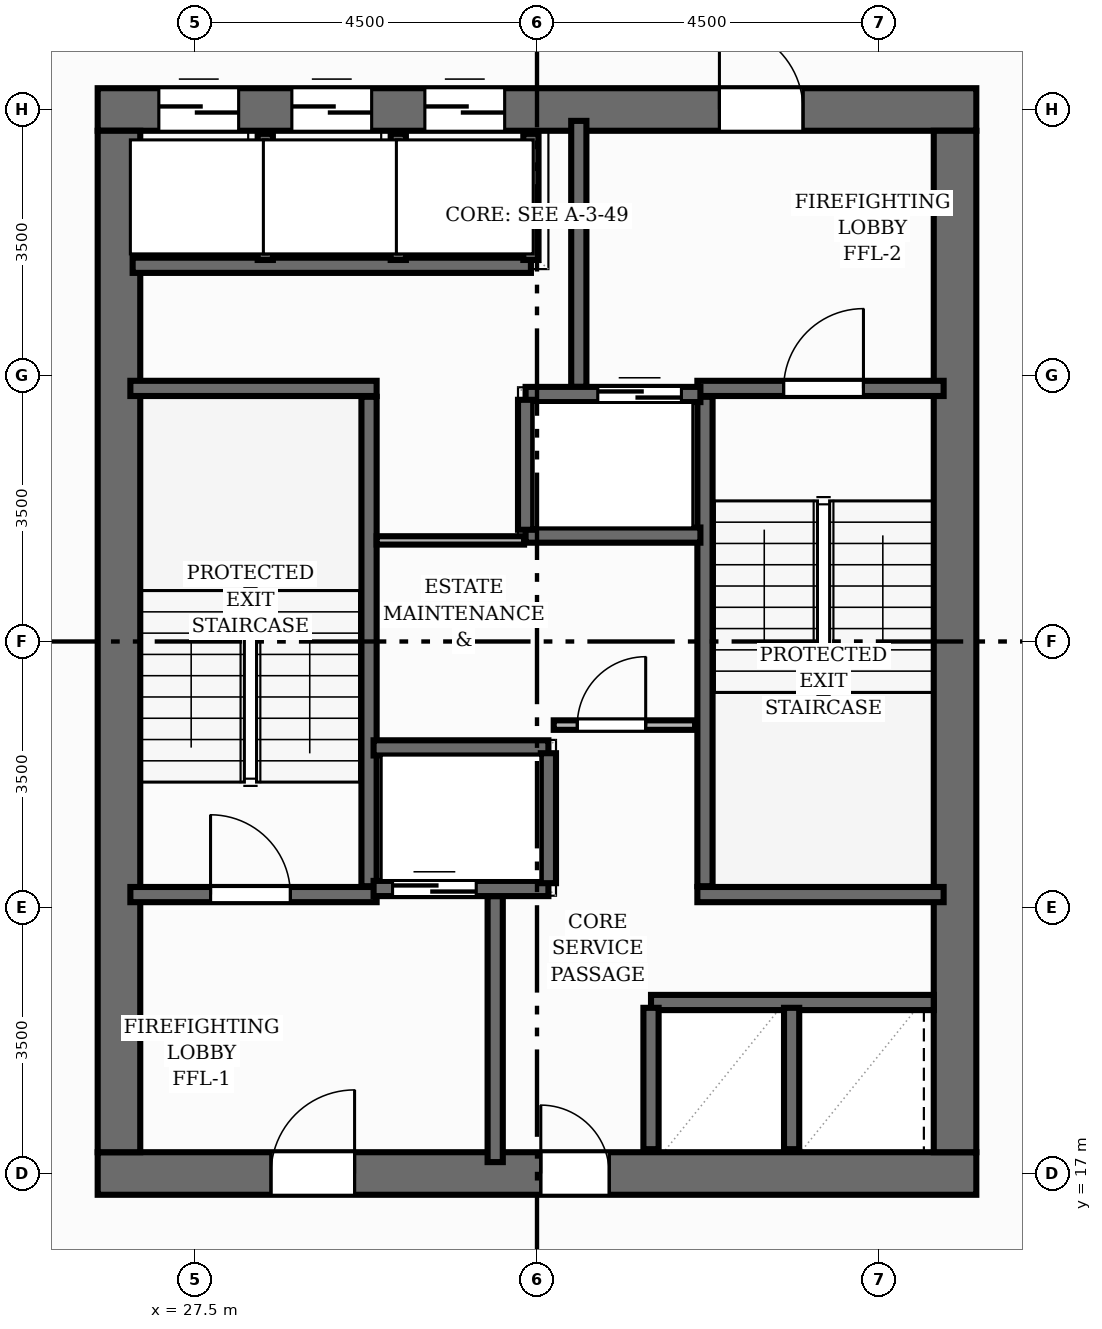
"""IFC4 building model, lengths in metres.
Left out: names, types, materials, properties, quantities, classifications, styles, units other than length and angle.
Written with IfcOpenShell. Run it as: python <this file> out.ifc"""

import sys

from ifc_helpers import new_model, si_unit, direction, frame, frame_2d, origin, place, context, subcontext, project, spatial, rectangle, extrude, element, fill, save


model = new_model("IFC4")
c1 = context("Model", 3, precision=1e-05, world=origin(), true_north=direction((0.0, 1.0)))
c2 = subcontext(c1, "Body", "Model", "MODEL_VIEW")
j1 = project(units=[si_unit("LENGTHUNIT", "METRE"), si_unit("PLANEANGLEUNIT", "RADIAN")], contexts=[c1])
p1 = place(None, origin())
s1 = spatial("IfcSite", under=j1, at=p1, CompositionType="ELEMENT")
p2 = place(p1, origin())
s2 = spatial("IfcBuilding", under=s1, at=p2, CompositionType="ELEMENT")
p3 = place(p2, frame((0.0, 0.0, 204.64)))
s3 = spatial("IfcBuildingStorey", under=s2, at=p3, CompositionType="ELEMENT", Elevation=204.64)
p4 = place(p3, frame((26.22, 17.0, 0.0), z_axis=(0.0, 0.0, 1.0), x_axis=(1.0, 0.0, 0.0)))
e1 = element("IfcWall", 1, at=p4, inside=s3, PredefinedType="SHEAR", context=c2, shape_type="SweptSolid", body=[
    extrude(rectangle(XDim=11.56, YDim=0.56, at=frame_2d((5.78, 0.0))), origin(), (0.0, 0.0, 1.0), 3.2),
])
p5 = place(p4, frame((2.28, 0.0, 0.0)))
e2 = element("IfcOpeningElement", 2, at=p5, cuts=e1, PredefinedType="OPENING", context=c2, shape_type="SweptSolid", body=[
    extrude(rectangle(XDim=1.1, YDim=2.15, at=frame_2d((0.55, 1.075))), frame((0.0, 0.29, 0.0), z_axis=(0.0, -1.0, 0.0), x_axis=(1.0, 0.0, 0.0)), (0.0, 0.0, 1.0), 0.58),
])
p6 = place(p4, frame((5.83, 0.0, 0.0)))
e3 = element("IfcOpeningElement", 3, at=p6, cuts=e1, PredefinedType="OPENING", context=c2, shape_type="SweptSolid", body=[
    extrude(rectangle(XDim=0.9, YDim=2.1, at=frame_2d((0.45, 1.05))), frame((0.0, 0.29, 0.0), z_axis=(0.0, -1.0, 0.0), x_axis=(1.0, 0.0, 0.0)), (0.0, 0.0, 1.0), 0.58),
])
p7 = place(p3, frame((26.22, 31.0, 0.0), z_axis=(0.0, 0.0, 1.0), x_axis=(1.0, 0.0, 0.0)))
e4 = element("IfcWall", 4, at=p7, inside=s3, PredefinedType="SHEAR", context=c2, shape_type="SweptSolid", body=[
    extrude(rectangle(XDim=11.56, YDim=0.56, at=frame_2d((5.78, 0.0))), origin(), (0.0, 0.0, 1.0), 3.2),
])
p8 = place(p7, frame((8.18, 0.0, 0.0)))
e5 = element("IfcOpeningElement", 5, at=p8, cuts=e4, PredefinedType="OPENING", context=c2, shape_type="SweptSolid", body=[
    extrude(rectangle(XDim=1.1, YDim=2.15, at=frame_2d((0.55, 1.075))), frame((0.0, 0.29, 0.0), z_axis=(0.0, -1.0, 0.0), x_axis=(1.0, 0.0, 0.0)), (0.0, 0.0, 1.0), 0.58),
])
p9 = place(p7, frame((0.805, 0.0, 0.0)))
e6 = element("IfcOpeningElement", 6, at=p9, cuts=e4, PredefinedType="OPENING", context=c2, shape_type="SweptSolid", body=[
    extrude(rectangle(XDim=1.05, YDim=2.15, at=frame_2d((0.525, 1.075))), frame((0.0, 0.29, 0.0), z_axis=(0.0, -1.0, 0.0), x_axis=(1.0, 0.0, 0.0)), (0.0, 0.0, 1.0), 0.58),
])
p10 = place(p7, frame((2.555, 0.0, 0.0)))
e7 = element("IfcOpeningElement", 7, at=p10, cuts=e4, PredefinedType="OPENING", context=c2, shape_type="SweptSolid", body=[
    extrude(rectangle(XDim=1.05, YDim=2.15, at=frame_2d((0.525, 1.075))), frame((0.0, 0.29, 0.0), z_axis=(0.0, -1.0, 0.0), x_axis=(1.0, 0.0, 0.0)), (0.0, 0.0, 1.0), 0.58),
])
p11 = place(p7, frame((4.305, 0.0, 0.0)))
e8 = element("IfcOpeningElement", 8, at=p11, cuts=e4, PredefinedType="OPENING", context=c2, shape_type="SweptSolid", body=[
    extrude(rectangle(XDim=1.05, YDim=2.15, at=frame_2d((0.525, 1.075))), frame((0.0, 0.29, 0.0), z_axis=(0.0, -1.0, 0.0), x_axis=(1.0, 0.0, 0.0)), (0.0, 0.0, 1.0), 0.58),
])
for number, where, z_axis, x_axis in (
    (9, (26.5, 17.28, 0.0), (0.0, 0.0, 1.0), (0.0, 1.0, 0.0)),
    (10, (37.5, 17.28, 0.0), (0.0, 0.0, 1.0), (0.0, 1.0, 0.0)),
):
    element("IfcWall", number, at=place(p3, frame(where, z_axis=z_axis, x_axis=x_axis)), inside=s3, PredefinedType="SHEAR", context=c2, shape_type="SweptSolid", body=[
        extrude(rectangle(XDim=13.44, YDim=0.56, at=frame_2d((6.72, 0.0))), origin(), (0.0, 0.0, 1.0), 3.2),
    ])
p12 = place(p3, frame((29.79, 20.78, 0.0), z_axis=(0.0, 0.0, 1.0), x_axis=(0.0, 1.0, 0.0)))
e11 = element("IfcWall", 11, at=p12, inside=s3, PredefinedType="SHEAR", context=c2, shape_type="SweptSolid", body=[
    extrude(rectangle(XDim=6.44, YDim=0.2, at=frame_2d((3.22, 0.0))), origin(), (0.0, 0.0, 1.0), 3.2),
])
p13 = place(p3, frame((26.65, 27.33, 0.0), z_axis=(0.0, 0.0, 1.0), x_axis=(1.0, 0.0, 0.0)))
e12 = element("IfcWall", 12, at=p13, inside=s3, PredefinedType="SHEAR", context=c2, shape_type="SweptSolid", body=[
    extrude(rectangle(XDim=3.24, YDim=0.2, at=frame_2d((1.62, 0.0))), origin(), (0.0, 0.0, 1.0), 3.2),
])
p14 = place(p3, frame((26.65, 20.67, 0.0), z_axis=(0.0, 0.0, 1.0), x_axis=(1.0, 0.0, 0.0)))
e13 = element("IfcWall", 13, at=p14, inside=s3, PredefinedType="SHEAR", context=c2, shape_type="SweptSolid", body=[
    extrude(rectangle(XDim=3.24, YDim=0.2, at=frame_2d((1.62, 0.0))), origin(), (0.0, 0.0, 1.0), 3.2),
])
p15 = place(p14, frame((1.055, 0.0, 0.0)))
e14 = element("IfcOpeningElement", 14, at=p15, cuts=e13, PredefinedType="OPENING", context=c2, shape_type="SweptSolid", body=[
    extrude(rectangle(XDim=1.05, YDim=2.15, at=frame_2d((0.525, 1.075))), frame((0.0, 0.11, 0.0), z_axis=(0.0, -1.0, 0.0), x_axis=(1.0, 0.0, 0.0)), (0.0, 0.0, 1.0), 0.22),
])
p16 = place(p3, frame((34.21, 20.78, 0.0), z_axis=(0.0, 0.0, 1.0), x_axis=(0.0, 1.0, 0.0)))
e15 = element("IfcWall", 15, at=p16, inside=s3, PredefinedType="SHEAR", context=c2, shape_type="SweptSolid", body=[
    extrude(rectangle(XDim=6.44, YDim=0.2, at=frame_2d((3.22, 0.0))), origin(), (0.0, 0.0, 1.0), 3.2),
])
p17 = place(p3, frame((34.11, 20.67, 0.0), z_axis=(0.0, 0.0, 1.0), x_axis=(1.0, 0.0, 0.0)))
e16 = element("IfcWall", 16, at=p17, inside=s3, PredefinedType="SHEAR", context=c2, shape_type="SweptSolid", body=[
    extrude(rectangle(XDim=3.24, YDim=0.2, at=frame_2d((1.62, 0.0))), origin(), (0.0, 0.0, 1.0), 3.2),
])
p18 = place(p3, frame((34.11, 27.33, 0.0), z_axis=(0.0, 0.0, 1.0), x_axis=(1.0, 0.0, 0.0)))
e17 = element("IfcWall", 17, at=p18, inside=s3, PredefinedType="SHEAR", context=c2, shape_type="SweptSolid", body=[
    extrude(rectangle(XDim=3.24, YDim=0.2, at=frame_2d((1.62, 0.0))), origin(), (0.0, 0.0, 1.0), 3.2),
])
p19 = place(p18, frame((1.135, 0.0, 0.0)))
e18 = element("IfcOpeningElement", 18, at=p19, cuts=e17, PredefinedType="OPENING", context=c2, shape_type="SweptSolid", body=[
    extrude(rectangle(XDim=1.05, YDim=2.15, at=frame_2d((0.525, 1.075))), frame((0.0, 0.11, 0.0), z_axis=(0.0, -1.0, 0.0), x_axis=(1.0, 0.0, 0.0)), (0.0, 0.0, 1.0), 0.22),
])
for number, where, z_axis, x_axis in (
    (19, (31.45, 17.15, 0.0), (0.0, 0.0, 1.0), (0.0, 1.0, 0.0)),
    (20, (32.55, 27.35, 0.0), (0.0, 0.0, 1.0), (0.0, 1.0, 0.0)),
):
    element("IfcWall", number, at=place(p3, frame(where, z_axis=z_axis, x_axis=x_axis)), inside=s3, PredefinedType="SHEAR", context=c2, shape_type="SweptSolid", body=[
        extrude(rectangle(XDim=3.5, YDim=0.2, at=frame_2d((1.75, 0.0))), origin(), (0.0, 0.0, 1.0), 3.2),
    ])
p20 = place(p3, frame((29.85, 20.75, 0.0), z_axis=(0.0, 0.0, 1.0), x_axis=(1.0, 0.0, 0.0)))
e21 = element("IfcWall", 21, at=p20, inside=s3, PredefinedType="SHEAR", context=c2, shape_type="SweptSolid", body=[
    extrude(rectangle(XDim=2.3, YDim=0.2, at=frame_2d((1.15, 0.0))), origin(), (0.0, 0.0, 1.0), 3.2),
])
p21 = place(p20, frame((0.25, 0.0, 0.0)))
e22 = element("IfcOpeningElement", 22, at=p21, cuts=e21, PredefinedType="OPENING", context=c2, shape_type="SweptSolid", body=[
    extrude(rectangle(XDim=1.1, YDim=2.15, at=frame_2d((0.55, 1.075))), frame((0.0, 0.11, 0.0), z_axis=(0.0, -1.0, 0.0), x_axis=(1.0, 0.0, 0.0)), (0.0, 0.0, 1.0), 0.22),
])
p22 = place(p3, frame((29.85, 22.6, 0.0), z_axis=(0.0, 0.0, 1.0), x_axis=(1.0, 0.0, 0.0)))
e23 = element("IfcWall", 23, at=p22, inside=s3, PredefinedType="SHEAR", context=c2, shape_type="SweptSolid", body=[
    extrude(rectangle(XDim=2.3, YDim=0.2, at=frame_2d((1.15, 0.0))), origin(), (0.0, 0.0, 1.0), 3.2),
])
p23 = place(p3, frame((32.15, 20.82, 0.0), z_axis=(0.0, 0.0, 1.0), x_axis=(0.0, 1.0, 0.0)))
e24 = element("IfcWall", 24, at=p23, inside=s3, PredefinedType="SHEAR", context=c2, shape_type="SweptSolid", body=[
    extrude(rectangle(XDim=1.71, YDim=0.2, at=frame_2d((0.855, 0.0))), origin(), (0.0, 0.0, 1.0), 3.2),
])
p24 = place(p3, frame((31.85, 27.25, 0.0), z_axis=(0.0, 0.0, 1.0), x_axis=(1.0, 0.0, 0.0)))
e25 = element("IfcWall", 25, at=p24, inside=s3, PredefinedType="SHEAR", context=c2, shape_type="SweptSolid", body=[
    extrude(rectangle(XDim=2.3, YDim=0.2, at=frame_2d((1.15, 0.0))), origin(), (0.0, 0.0, 1.0), 3.2),
])
p25 = place(p24, frame((0.95, 0.0, 0.0)))
e26 = element("IfcOpeningElement", 26, at=p25, cuts=e25, PredefinedType="OPENING", context=c2, shape_type="SweptSolid", body=[
    extrude(rectangle(XDim=1.1, YDim=2.15, at=frame_2d((0.55, 1.075))), frame((0.0, 0.11, 0.0), z_axis=(0.0, -1.0, 0.0), x_axis=(1.0, 0.0, 0.0)), (0.0, 0.0, 1.0), 0.22),
])
p26 = place(p3, frame((31.85, 25.4, 0.0), z_axis=(0.0, 0.0, 1.0), x_axis=(1.0, 0.0, 0.0)))
e27 = element("IfcWall", 27, at=p26, inside=s3, PredefinedType="SHEAR", context=c2, shape_type="SweptSolid", body=[
    extrude(rectangle(XDim=2.3, YDim=0.2, at=frame_2d((1.15, 0.0))), origin(), (0.0, 0.0, 1.0), 3.2),
])
p27 = place(p3, frame((31.85, 25.47, 0.0), z_axis=(0.0, 0.0, 1.0), x_axis=(0.0, 1.0, 0.0)))
e28 = element("IfcWall", 28, at=p27, inside=s3, PredefinedType="SHEAR", context=c2, shape_type="SweptSolid", body=[
    extrude(rectangle(XDim=1.71, YDim=0.2, at=frame_2d((0.855, 0.0))), origin(), (0.0, 0.0, 1.0), 3.2),
])
p28 = place(p3, frame((26.68, 28.95, 0.0), z_axis=(0.0, 0.0, 1.0), x_axis=(1.0, 0.0, 0.0)))
e29 = element("IfcWall", 29, at=p28, inside=s3, PredefinedType="SHEAR", context=c2, shape_type="SweptSolid", body=[
    extrude(rectangle(XDim=5.24, YDim=0.2, at=frame_2d((2.62, 0.0))), origin(), (0.0, 0.0, 1.0), 3.2),
])
for number, where, z_axis, x_axis in (
    (30, (31.92, 29.02, 0.0), (0.0, 0.0, 1.0), (0.0, 1.0, 0.0)),
    (31, (28.425, 29.02, 0.0), (0.0, 0.0, 1.0), (0.0, 1.0, 0.0)),
    (32, (30.175, 29.02, 0.0), (0.0, 0.0, 1.0), (0.0, 1.0, 0.0)),
):
    element("IfcWall", number, at=place(p3, frame(where, z_axis=z_axis, x_axis=x_axis)), inside=s3, PredefinedType="SHEAR", context=c2, shape_type="SweptSolid", body=[
        extrude(rectangle(XDim=1.66, YDim=0.2, at=frame_2d((0.83, 0.0))), origin(), (0.0, 0.0, 1.0), 3.2),
    ])
p29 = place(p3, frame((33.5, 19.25, 0.0), z_axis=(0.0, 0.0, 1.0), x_axis=(1.0, 0.0, 0.0)))
e33 = element("IfcWall", 33, at=p29, inside=s3, PredefinedType="SHEAR", context=c2, shape_type="SweptSolid", body=[
    extrude(rectangle(XDim=3.72, YDim=0.2, at=frame_2d((1.86, 0.0))), origin(), (0.0, 0.0, 1.0), 3.2),
])
for number, where, z_axis, x_axis in (
    (34, (33.5, 17.32, 0.0), (0.0, 0.0, 1.0), (0.0, 1.0, 0.0)),
    (35, (35.35, 17.32, 0.0), (0.0, 0.0, 1.0), (0.0, 1.0, 0.0)),
):
    element("IfcWall", number, at=place(p3, frame(where, z_axis=z_axis, x_axis=x_axis)), inside=s3, PredefinedType="SHEAR", context=c2, shape_type="SweptSolid", body=[
        extrude(rectangle(XDim=1.86, YDim=0.2, at=frame_2d((0.93, 0.0))), origin(), (0.0, 0.0, 1.0), 3.2),
    ])
p30 = place(p3, frame((32.22, 22.9, 0.0), z_axis=(0.0, 0.0, 1.0), x_axis=(1.0, 0.0, 0.0)))
e36 = element("IfcWall", 36, at=p30, inside=s3, PredefinedType="PARTITIONING", context=c2, shape_type="SweptSolid", body=[
    extrude(rectangle(XDim=1.86, YDim=0.125, at=frame_2d((0.93, 0.0))), origin(), (0.0, 0.0, 1.0), 2.955),
])
p31 = place(p30, frame((0.31, 0.0, 0.0)))
e37 = element("IfcOpeningElement", 37, at=p31, cuts=e36, PredefinedType="OPENING", context=c2, shape_type="SweptSolid", body=[
    extrude(rectangle(XDim=0.9, YDim=2.1, at=frame_2d((0.45, 1.05))), frame((0.0, 0.073, 0.0), z_axis=(0.0, -1.0, 0.0), x_axis=(1.0, 0.0, 0.0)), (0.0, 0.0, 1.0), 0.145),
])
p32 = place(p3, frame((29.89, 25.33, 0.0), z_axis=(0.0, 0.0, 1.0), x_axis=(1.0, 0.0, 0.0)))
e38 = element("IfcWall", 38, at=p32, inside=s3, PredefinedType="MOVABLE", context=c2, shape_type="SweptSolid", body=[
    extrude(rectangle(XDim=1.94, YDim=0.11, at=frame_2d((0.97, 0.0))), origin(), (0.0, 0.0, 1.0), 2.955),
])
p33 = place(p15, origin())
e39 = element("IfcDoor", 39, at=p33, inside=s3, OperationType="SINGLE_SWING_LEFT", PredefinedType="DOOR", context=c2, shape_type="SweptSolid", body=[
    extrude(rectangle(XDim=1.05, YDim=2.15, at=frame_2d((0.525, 1.075))), frame((0.0, 0.025, 0.0), z_axis=(0.0, -1.0, 0.0), x_axis=(1.0, 0.0, 0.0)), (0.0, 0.0, 1.0), 0.05),
])
fill(e14, e39)
p34 = place(p19, origin())
e40 = element("IfcDoor", 40, at=p34, inside=s3, OperationType="SINGLE_SWING_RIGHT", PredefinedType="DOOR", context=c2, shape_type="SweptSolid", body=[
    extrude(rectangle(XDim=1.05, YDim=2.15, at=frame_2d((0.525, 1.075))), frame((0.0, 0.025, 0.0), z_axis=(0.0, -1.0, 0.0), x_axis=(1.0, 0.0, 0.0)), (0.0, 0.0, 1.0), 0.05),
])
fill(e18, e40)
p35 = place(p5, origin())
e41 = element("IfcDoor", 41, at=p35, inside=s3, OperationType="SINGLE_SWING_RIGHT", PredefinedType="DOOR", context=c2, shape_type="SweptSolid", body=[
    extrude(rectangle(XDim=1.1, YDim=2.15, at=frame_2d((0.55, 1.075))), frame((0.0, 0.025, 0.0), z_axis=(0.0, -1.0, 0.0), x_axis=(1.0, 0.0, 0.0)), (0.0, 0.0, 1.0), 0.05),
])
fill(e2, e41)
p36 = place(p8, origin())
e42 = element("IfcDoor", 42, at=p36, inside=s3, OperationType="SINGLE_SWING_LEFT", PredefinedType="DOOR", context=c2, shape_type="SweptSolid", body=[
    extrude(rectangle(XDim=1.1, YDim=2.15, at=frame_2d((0.55, 1.075))), frame((0.0, 0.025, 0.0), z_axis=(0.0, -1.0, 0.0), x_axis=(1.0, 0.0, 0.0)), (0.0, 0.0, 1.0), 0.05),
])
fill(e5, e42)
p37 = place(p21, origin())
e43 = element("IfcDoor", 43, at=p37, inside=s3, OperationType="DOUBLE_DOOR_SLIDING", PredefinedType="DOOR", context=c2, shape_type="SweptSolid", body=[
    extrude(rectangle(XDim=1.1, YDim=2.15, at=frame_2d((0.55, 1.075))), frame((0.0, 0.025, 0.0), z_axis=(0.0, -1.0, 0.0), x_axis=(1.0, 0.0, 0.0)), (0.0, 0.0, 1.0), 0.05),
])
fill(e22, e43)
p38 = place(p25, origin())
e44 = element("IfcDoor", 44, at=p38, inside=s3, OperationType="DOUBLE_DOOR_SLIDING", PredefinedType="DOOR", context=c2, shape_type="SweptSolid", body=[
    extrude(rectangle(XDim=1.1, YDim=2.15, at=frame_2d((0.55, 1.075))), frame((0.0, 0.025, 0.0), z_axis=(0.0, -1.0, 0.0), x_axis=(1.0, 0.0, 0.0)), (0.0, 0.0, 1.0), 0.05),
])
fill(e26, e44)
p39 = place(p9, origin())
e45 = element("IfcDoor", 45, at=p39, inside=s3, OperationType="DOUBLE_DOOR_SLIDING", PredefinedType="DOOR", context=c2, shape_type="SweptSolid", body=[
    extrude(rectangle(XDim=1.05, YDim=2.15, at=frame_2d((0.525, 1.075))), frame((0.0, 0.025, 0.0), z_axis=(0.0, -1.0, 0.0), x_axis=(1.0, 0.0, 0.0)), (0.0, 0.0, 1.0), 0.05),
])
fill(e6, e45)
p40 = place(p10, origin())
e46 = element("IfcDoor", 46, at=p40, inside=s3, OperationType="DOUBLE_DOOR_SLIDING", PredefinedType="DOOR", context=c2, shape_type="SweptSolid", body=[
    extrude(rectangle(XDim=1.05, YDim=2.15, at=frame_2d((0.525, 1.075))), frame((0.0, 0.025, 0.0), z_axis=(0.0, -1.0, 0.0), x_axis=(1.0, 0.0, 0.0)), (0.0, 0.0, 1.0), 0.05),
])
fill(e7, e46)
p41 = place(p11, origin())
e47 = element("IfcDoor", 47, at=p41, inside=s3, OperationType="DOUBLE_DOOR_SLIDING", PredefinedType="DOOR", context=c2, shape_type="SweptSolid", body=[
    extrude(rectangle(XDim=1.05, YDim=2.15, at=frame_2d((0.525, 1.075))), frame((0.0, 0.025, 0.0), z_axis=(0.0, -1.0, 0.0), x_axis=(1.0, 0.0, 0.0)), (0.0, 0.0, 1.0), 0.05),
])
fill(e8, e47)
p42 = place(p6, origin())
e48 = element("IfcDoor", 48, at=p42, inside=s3, OperationType="SINGLE_SWING_LEFT", PredefinedType="DOOR", context=c2, shape_type="SweptSolid", body=[
    extrude(rectangle(XDim=0.9, YDim=2.1, at=frame_2d((0.45, 1.05))), frame((0.0, 0.025, 0.0), z_axis=(0.0, -1.0, 0.0), x_axis=(1.0, 0.0, 0.0)), (0.0, 0.0, 1.0), 0.05),
])
fill(e3, e48)
p43 = place(p31, origin())
e49 = element("IfcDoor", 49, at=p43, inside=s3, OperationType="SINGLE_SWING_RIGHT", PredefinedType="DOOR", context=c2, shape_type="SweptSolid", body=[
    extrude(rectangle(XDim=0.9, YDim=2.1, at=frame_2d((0.45, 1.05))), frame((0.0, 0.025, 0.0), z_axis=(0.0, -1.0, 0.0), x_axis=(1.0, 0.0, 0.0)), (0.0, 0.0, 1.0), 0.05),
])
fill(e37, e49)
save(model, sys.argv[1])
